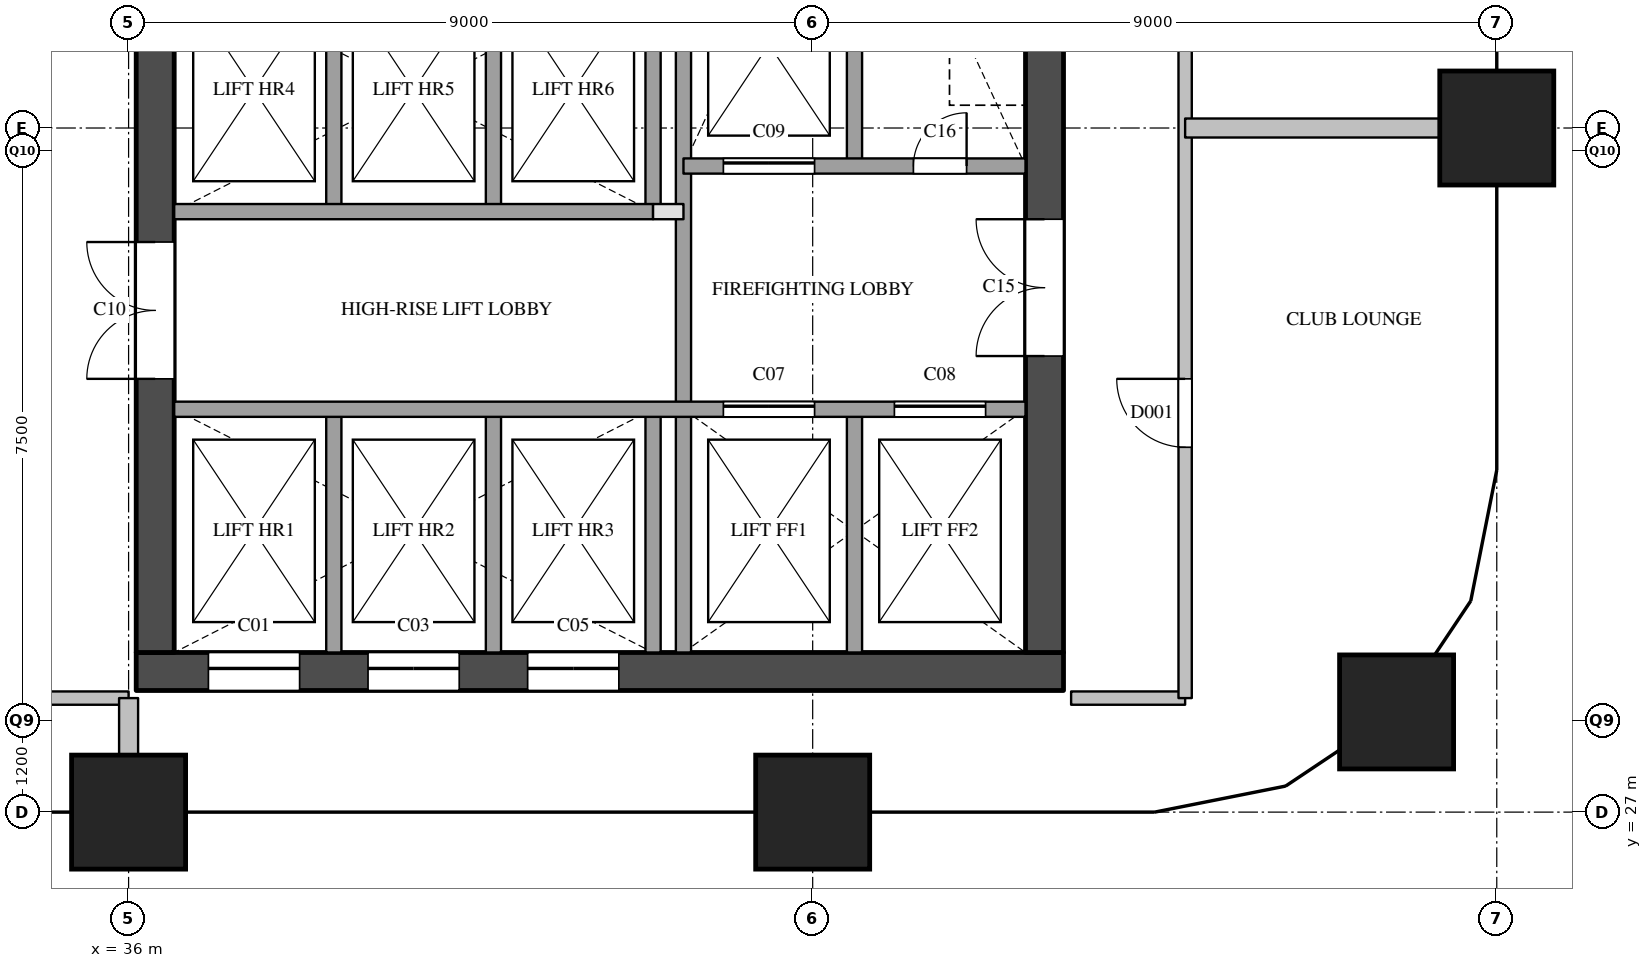
"""IFC4 building model, lengths in metres.
Left out: names, types, materials, properties, quantities, classifications, styles, units other than length and angle.
Written with IfcOpenShell. Run it as: python <this file> out.ifc"""

import sys

from ifc_helpers import new_model, si_unit, direction, frame, frame_2d, origin, origin_2d, place, context, subcontext, project, spatial, rectangle, extrude, element, fill, save


model = new_model("IFC4")
c1 = context("Model", 3, precision=1e-05, world=origin(), true_north=direction((0.0, 1.0)))
c2 = subcontext(c1, "Body", "Model", "MODEL_VIEW")
j1 = project(units=[si_unit("LENGTHUNIT", "METRE"), si_unit("PLANEANGLEUNIT", "RADIAN")], contexts=[c1])
p1 = place(None, origin())
s1 = spatial("IfcSite", under=j1, at=p1, CompositionType="ELEMENT")
p2 = place(p1, origin())
s2 = spatial("IfcBuilding", under=s1, at=p2, CompositionType="ELEMENT")
p3 = place(p2, frame((0.0, 0.0, 138.8)))
s3 = spatial("IfcBuildingStorey", under=s2, at=p3, CompositionType="ELEMENT", Elevation=138.8)
for number, where, z_axis, x_axis in (
    (1, (36.0, 27.0, 0.0), (0.0, 0.0, 1.0), (1.0, 0.0, 0.0)),
    (2, (45.0, 27.0, 0.0), (0.0, 0.0, 1.0), (1.0, 0.0, 0.0)),
    (3, (52.682, 28.318, 0.0), (0.0, 0.0, 1.0), (1.0, 0.0, 0.0)),
    (4, (54.0, 36.0, 0.0), (0.0, 0.0, 1.0), (1.0, 0.0, 0.0)),
):
    element("IfcColumn", number, at=place(p3, frame(where, z_axis=z_axis, x_axis=x_axis)), inside=s3, PredefinedType="COLUMN", context=c2, shape_type="SweptSolid", body=[
        extrude(rectangle(XDim=1.5, YDim=1.5, at=origin_2d()), origin(), (0.0, 0.0, 1.0), 3.9),
    ])
p4 = place(p3, frame((36.1, 28.85, 0.0), z_axis=(0.0, 0.0, 1.0), x_axis=(1.0, 0.0, 0.0)))
e5 = element("IfcWall", 5, at=p4, inside=s3, PredefinedType="SHEAR", context=c2, shape_type="SweptSolid", body=[
    extrude(rectangle(XDim=12.2, YDim=0.5, at=frame_2d((6.1, 0.0))), origin(), (0.0, 0.0, 1.0), 3.6),
])
p5 = place(p4, frame((0.95, 0.0, 0.0)))
e6 = element("IfcOpeningElement", 6, at=p5, cuts=e5, PredefinedType="OPENING", context=c2, shape_type="SweptSolid", body=[
    extrude(rectangle(XDim=1.2, YDim=2.1, at=frame_2d((0.6, 1.05))), frame((0.0, 0.26, 0.0), z_axis=(0.0, -1.0, 0.0), x_axis=(1.0, 0.0, 0.0)), (0.0, 0.0, 1.0), 0.52),
])
p6 = place(p4, frame((3.05, 0.0, 0.0)))
e7 = element("IfcOpeningElement", 7, at=p6, cuts=e5, PredefinedType="OPENING", context=c2, shape_type="SweptSolid", body=[
    extrude(rectangle(XDim=1.2, YDim=2.1, at=frame_2d((0.6, 1.05))), frame((0.0, 0.26, 0.0), z_axis=(0.0, -1.0, 0.0), x_axis=(1.0, 0.0, 0.0)), (0.0, 0.0, 1.0), 0.52),
])
p7 = place(p4, frame((5.15, 0.0, 0.0)))
e8 = element("IfcOpeningElement", 8, at=p7, cuts=e5, PredefinedType="OPENING", context=c2, shape_type="SweptSolid", body=[
    extrude(rectangle(XDim=1.2, YDim=2.1, at=frame_2d((0.6, 1.05))), frame((0.0, 0.26, 0.0), z_axis=(0.0, -1.0, 0.0), x_axis=(1.0, 0.0, 0.0)), (0.0, 0.0, 1.0), 0.52),
])
p8 = place(p3, frame((36.35, 29.1, 0.0), z_axis=(0.0, 0.0, 1.0), x_axis=(0.0, 1.0, 0.0)))
e9 = element("IfcWall", 9, at=p8, inside=s3, PredefinedType="SHEAR", context=c2, shape_type="SweptSolid", body=[
    extrude(rectangle(XDim=20.3, YDim=0.5, at=frame_2d((10.15, 0.0))), origin(), (0.0, 0.0, 1.0), 3.6),
])
p9 = place(p8, frame((3.6, 0.0, 0.0)))
e10 = element("IfcOpeningElement", 10, at=p9, cuts=e9, PredefinedType="OPENING", context=c2, shape_type="SweptSolid", body=[
    extrude(rectangle(XDim=1.8, YDim=2.1, at=frame_2d((0.9, 1.05))), frame((0.0, 0.26, 0.0), z_axis=(0.0, -1.0, 0.0), x_axis=(1.0, 0.0, 0.0)), (0.0, 0.0, 1.0), 0.52),
])
p10 = place(p8, frame((16.4, 0.0, 0.0)))
e11 = element("IfcOpeningElement", 11, at=p10, cuts=e9, PredefinedType="OPENING", context=c2, shape_type="SweptSolid", body=[
    extrude(rectangle(XDim=1.0, YDim=2.1, at=frame_2d((0.5, 1.05))), frame((0.0, 0.26, 0.0), z_axis=(0.0, -1.0, 0.0), x_axis=(1.0, 0.0, 0.0)), (0.0, 0.0, 1.0), 0.52),
])
p11 = place(p3, frame((48.05, 29.1, 0.0), z_axis=(0.0, 0.0, 1.0), x_axis=(0.0, 1.0, 0.0)))
e12 = element("IfcWall", 12, at=p11, inside=s3, PredefinedType="SHEAR", context=c2, shape_type="SweptSolid", body=[
    extrude(rectangle(XDim=20.3, YDim=0.5, at=frame_2d((10.15, 0.0))), origin(), (0.0, 0.0, 1.0), 3.6),
])
p12 = place(p11, frame((12.5, 0.0, 0.0)))
e13 = element("IfcOpeningElement", 13, at=p12, cuts=e12, PredefinedType="OPENING", context=c2, shape_type="SweptSolid", body=[
    extrude(rectangle(XDim=0.7, YDim=2.1, at=frame_2d((0.35, 1.05))), frame((0.0, 0.26, 0.0), z_axis=(0.0, -1.0, 0.0), x_axis=(1.0, 0.0, 0.0)), (0.0, 0.0, 1.0), 0.52),
])
p13 = place(p11, frame((3.9, 0.0, 0.0)))
e14 = element("IfcOpeningElement", 14, at=p13, cuts=e12, PredefinedType="OPENING", context=c2, shape_type="SweptSolid", body=[
    extrude(rectangle(XDim=1.8, YDim=2.1, at=frame_2d((0.9, 1.05))), frame((0.0, 0.26, 0.0), z_axis=(0.0, -1.0, 0.0), x_axis=(1.0, 0.0, 0.0)), (0.0, 0.0, 1.0), 0.52),
])
p14 = place(p3, frame((38.7, 29.1, 0.0), z_axis=(0.0, 0.0, 1.0), x_axis=(0.0, 1.0, 0.0)))
e15 = element("IfcWall", 15, at=p14, inside=s3, PredefinedType="SOLIDWALL", context=c2, shape_type="SweptSolid", body=[
    extrude(rectangle(XDim=3.2, YDim=0.2, at=frame_2d((1.6, 0.0))), origin(), (0.0, 0.0, 1.0), 3.6),
])
p15 = place(p3, frame((38.7, 34.9, 0.0), z_axis=(0.0, 0.0, 1.0), x_axis=(0.0, 1.0, 0.0)))
e16 = element("IfcWall", 16, at=p15, inside=s3, PredefinedType="SOLIDWALL", context=c2, shape_type="SweptSolid", body=[
    extrude(rectangle(XDim=3.2, YDim=0.2, at=frame_2d((1.6, 0.0))), origin(), (0.0, 0.0, 1.0), 3.6),
])
p16 = place(p3, frame((40.8, 29.1, 0.0), z_axis=(0.0, 0.0, 1.0), x_axis=(0.0, 1.0, 0.0)))
e17 = element("IfcWall", 17, at=p16, inside=s3, PredefinedType="SOLIDWALL", context=c2, shape_type="SweptSolid", body=[
    extrude(rectangle(XDim=3.2, YDim=0.2, at=frame_2d((1.6, 0.0))), origin(), (0.0, 0.0, 1.0), 3.6),
])
p17 = place(p3, frame((40.8, 34.9, 0.0), z_axis=(0.0, 0.0, 1.0), x_axis=(0.0, 1.0, 0.0)))
e18 = element("IfcWall", 18, at=p17, inside=s3, PredefinedType="SOLIDWALL", context=c2, shape_type="SweptSolid", body=[
    extrude(rectangle(XDim=3.2, YDim=0.2, at=frame_2d((1.6, 0.0))), origin(), (0.0, 0.0, 1.0), 3.6),
])
p18 = place(p3, frame((42.9, 29.1, 0.0), z_axis=(0.0, 0.0, 1.0), x_axis=(0.0, 1.0, 0.0)))
e19 = element("IfcWall", 19, at=p18, inside=s3, PredefinedType="SOLIDWALL", context=c2, shape_type="SweptSolid", body=[
    extrude(rectangle(XDim=3.2, YDim=0.2, at=frame_2d((1.6, 0.0))), origin(), (0.0, 0.0, 1.0), 3.6),
])
p19 = place(p3, frame((42.9, 34.9, 0.0), z_axis=(0.0, 0.0, 1.0), x_axis=(0.0, 1.0, 0.0)))
e20 = element("IfcWall", 20, at=p19, inside=s3, PredefinedType="SOLIDWALL", context=c2, shape_type="SweptSolid", body=[
    extrude(rectangle(XDim=3.2, YDim=0.2, at=frame_2d((1.6, 0.0))), origin(), (0.0, 0.0, 1.0), 3.6),
])
p20 = place(p3, frame((43.3, 29.1, 0.0), z_axis=(0.0, 0.0, 1.0), x_axis=(0.0, 1.0, 0.0)))
e21 = element("IfcWall", 21, at=p20, inside=s3, PredefinedType="SOLIDWALL", context=c2, shape_type="SweptSolid", body=[
    extrude(rectangle(XDim=9.9, YDim=0.2, at=frame_2d((4.95, 0.0))), origin(), (0.0, 0.0, 1.0), 3.6),
])
for number, where, z_axis, x_axis in (
    (22, (45.55, 29.1, 0.0), (0.0, 0.0, 1.0), (0.0, 1.0, 0.0)),
    (23, (45.55, 35.5, 0.0), (0.0, 0.0, 1.0), (0.0, 1.0, 0.0)),
):
    element("IfcWall", number, at=place(p3, frame(where, z_axis=z_axis, x_axis=x_axis)), inside=s3, PredefinedType="SOLIDWALL", context=c2, shape_type="SweptSolid", body=[
        extrude(rectangle(XDim=3.2, YDim=0.2, at=frame_2d((1.6, 0.0))), origin(), (0.0, 0.0, 1.0), 3.6),
    ])
p21 = place(p3, frame((36.6, 32.3, 0.0), z_axis=(0.0, 0.0, 1.0), x_axis=(1.0, 0.0, 0.0)))
e24 = element("IfcWall", 24, at=p21, inside=s3, PredefinedType="SOLIDWALL", context=c2, shape_type="SweptSolid", body=[
    extrude(rectangle(XDim=11.2, YDim=0.2, at=frame_2d((5.6, 0.0))), origin(), (0.0, 0.0, 1.0), 3.6),
])
p22 = place(p21, frame((7.225, 0.0, 0.0)))
e25 = element("IfcOpeningElement", 25, at=p22, cuts=e24, PredefinedType="OPENING", context=c2, shape_type="SweptSolid", body=[
    extrude(rectangle(XDim=1.2, YDim=2.1, at=frame_2d((0.6, 1.05))), frame((0.0, 0.11, 0.0), z_axis=(0.0, -1.0, 0.0), x_axis=(1.0, 0.0, 0.0)), (0.0, 0.0, 1.0), 0.22),
])
p23 = place(p21, frame((9.475, 0.0, 0.0)))
e26 = element("IfcOpeningElement", 26, at=p23, cuts=e24, PredefinedType="OPENING", context=c2, shape_type="SweptSolid", body=[
    extrude(rectangle(XDim=1.2, YDim=2.1, at=frame_2d((0.6, 1.05))), frame((0.0, 0.11, 0.0), z_axis=(0.0, -1.0, 0.0), x_axis=(1.0, 0.0, 0.0)), (0.0, 0.0, 1.0), 0.22),
])
p24 = place(p3, frame((42.9, 34.9, 0.0), z_axis=(0.0, 0.0, 1.0), x_axis=(1.0, 0.0, 0.0)))
e27 = element("IfcWall", 27, at=p24, inside=s3, PredefinedType="PARTITIONING", context=c2, shape_type="SweptSolid", body=[
    extrude(rectangle(XDim=0.4, YDim=0.2, at=frame_2d((0.2, 0.0))), origin(), (0.0, 0.0, 1.0), 3.6),
])
p25 = place(p3, frame((36.6, 34.9, 0.0), z_axis=(0.0, 0.0, 1.0), x_axis=(1.0, 0.0, 0.0)))
e28 = element("IfcWall", 28, at=p25, inside=s3, PredefinedType="SOLIDWALL", context=c2, shape_type="SweptSolid", body=[
    extrude(rectangle(XDim=6.3, YDim=0.2, at=frame_2d((3.15, 0.0))), origin(), (0.0, 0.0, 1.0), 3.6),
])
p26 = place(p3, frame((43.3, 35.5, 0.0), z_axis=(0.0, 0.0, 1.0), x_axis=(1.0, 0.0, 0.0)))
e29 = element("IfcWall", 29, at=p26, inside=s3, PredefinedType="SOLIDWALL", context=c2, shape_type="SweptSolid", body=[
    extrude(rectangle(XDim=4.5, YDim=0.2, at=frame_2d((2.25, 0.0))), origin(), (0.0, 0.0, 1.0), 3.6),
])
p27 = place(p26, frame((0.525, 0.0, 0.0)))
e30 = element("IfcOpeningElement", 30, at=p27, cuts=e29, PredefinedType="OPENING", context=c2, shape_type="SweptSolid", body=[
    extrude(rectangle(XDim=1.2, YDim=2.1, at=frame_2d((0.6, 1.05))), frame((0.0, 0.11, 0.0), z_axis=(0.0, -1.0, 0.0), x_axis=(1.0, 0.0, 0.0)), (0.0, 0.0, 1.0), 0.22),
])
p28 = place(p26, frame((3.025, 0.0, 0.0)))
e31 = element("IfcOpeningElement", 31, at=p28, cuts=e29, PredefinedType="OPENING", context=c2, shape_type="SweptSolid", body=[
    extrude(rectangle(XDim=0.7, YDim=2.1, at=frame_2d((0.35, 1.05))), frame((0.0, 0.11, 0.0), z_axis=(0.0, -1.0, 0.0), x_axis=(1.0, 0.0, 0.0)), (0.0, 0.0, 1.0), 0.22),
])
for number, where, z_axis, x_axis in (
    (32, (34.5, 28.5, 0.0), (0.0, 0.0, 1.0), (1.0, 0.0, 0.0)),
    (33, (48.4, 28.5, 0.0), (0.0, 0.0, 1.0), (1.0, 0.0, 0.0)),
):
    element("IfcWall", number, at=place(p3, frame(where, z_axis=z_axis, x_axis=x_axis)), inside=s3, PredefinedType="PARTITIONING", context=c2, shape_type="SweptSolid", body=[
        extrude(rectangle(XDim=1.5, YDim=0.175, at=frame_2d((0.75, 0.0))), origin(), (0.0, 0.0, 1.0), 3.6),
    ])
p29 = place(p3, frame((49.9, 28.5, 0.0), z_axis=(0.0, 0.0, 1.0), x_axis=(0.0, 1.0, 0.0)))
e34 = element("IfcWall", 34, at=p29, inside=s3, PredefinedType="PARTITIONING", context=c2, shape_type="SweptSolid", body=[
    extrude(rectangle(XDim=23.0, YDim=0.175, at=frame_2d((11.5, 0.0))), origin(), (0.0, 0.0, 1.0), 3.6),
])
p30 = place(p29, frame((3.3, 0.0, 0.0)))
e35 = element("IfcOpeningElement", 35, at=p30, cuts=e34, PredefinedType="OPENING", context=c2, shape_type="SweptSolid", body=[
    extrude(rectangle(XDim=0.9, YDim=2.1, at=frame_2d((0.45, 1.05))), frame((0.0, 0.097, 0.0), z_axis=(0.0, -1.0, 0.0), x_axis=(1.0, 0.0, 0.0)), (0.0, 0.0, 1.0), 0.195),
])
p31 = place(p29, frame((11.05, 0.0, 0.0)))
e36 = element("IfcOpeningElement", 36, at=p31, cuts=e34, PredefinedType="OPENING", context=c2, shape_type="SweptSolid", body=[
    extrude(rectangle(XDim=0.9, YDim=2.1, at=frame_2d((0.45, 1.05))), frame((0.0, 0.097, 0.0), z_axis=(0.0, -1.0, 0.0), x_axis=(1.0, 0.0, 0.0)), (0.0, 0.0, 1.0), 0.195),
])
p32 = place(p29, frame((18.8, 0.0, 0.0)))
e37 = element("IfcOpeningElement", 37, at=p32, cuts=e34, PredefinedType="OPENING", context=c2, shape_type="SweptSolid", body=[
    extrude(rectangle(XDim=0.9, YDim=2.1, at=frame_2d((0.45, 1.05))), frame((0.0, 0.097, 0.0), z_axis=(0.0, -1.0, 0.0), x_axis=(1.0, 0.0, 0.0)), (0.0, 0.0, 1.0), 0.195),
])
p33 = place(p3, frame((49.9, 36.0, 0.0), z_axis=(0.0, 0.0, 1.0), x_axis=(1.0, 0.0, 0.0)))
e38 = element("IfcWall", 38, at=p33, inside=s3, PredefinedType="PARTITIONING", context=c2, shape_type="SweptSolid", body=[
    extrude(rectangle(XDim=4.1, YDim=0.25, at=frame_2d((2.05, 0.0))), origin(), (0.0, 0.0, 1.0), 3.6),
])
p34 = place(p3, frame((36.0, 27.0, 0.0), z_axis=(0.0, 0.0, 1.0), x_axis=(0.0, 1.0, 0.0)))
e39 = element("IfcWall", 39, at=p34, inside=s3, PredefinedType="PARTITIONING", context=c2, shape_type="SweptSolid", body=[
    extrude(rectangle(XDim=1.5, YDim=0.25, at=frame_2d((0.75, 0.0))), origin(), (0.0, 0.0, 1.0), 3.6),
])
p35 = place(p5, origin())
e40 = element("IfcDoor", 40, at=p35, inside=s3, OperationType="SLIDING_TO_LEFT", PredefinedType="DOOR", context=c2, shape_type="SweptSolid", body=[
    extrude(rectangle(XDim=1.2, YDim=2.1, at=frame_2d((0.6, 1.05))), frame((0.0, 0.025, 0.0), z_axis=(0.0, -1.0, 0.0), x_axis=(1.0, 0.0, 0.0)), (0.0, 0.0, 1.0), 0.05),
])
fill(e6, e40)
p36 = place(p6, origin())
e41 = element("IfcDoor", 41, at=p36, inside=s3, OperationType="SLIDING_TO_LEFT", PredefinedType="DOOR", context=c2, shape_type="SweptSolid", body=[
    extrude(rectangle(XDim=1.2, YDim=2.1, at=frame_2d((0.6, 1.05))), frame((0.0, 0.025, 0.0), z_axis=(0.0, -1.0, 0.0), x_axis=(1.0, 0.0, 0.0)), (0.0, 0.0, 1.0), 0.05),
])
fill(e7, e41)
p37 = place(p7, origin())
e42 = element("IfcDoor", 42, at=p37, inside=s3, OperationType="SLIDING_TO_LEFT", PredefinedType="DOOR", context=c2, shape_type="SweptSolid", body=[
    extrude(rectangle(XDim=1.2, YDim=2.1, at=frame_2d((0.6, 1.05))), frame((0.0, 0.025, 0.0), z_axis=(0.0, -1.0, 0.0), x_axis=(1.0, 0.0, 0.0)), (0.0, 0.0, 1.0), 0.05),
])
fill(e8, e42)
p38 = place(p22, origin())
e43 = element("IfcDoor", 43, at=p38, inside=s3, OperationType="SLIDING_TO_LEFT", PredefinedType="DOOR", context=c2, shape_type="SweptSolid", body=[
    extrude(rectangle(XDim=1.2, YDim=2.1, at=frame_2d((0.6, 1.05))), frame((0.0, 0.025, 0.0), z_axis=(0.0, -1.0, 0.0), x_axis=(1.0, 0.0, 0.0)), (0.0, 0.0, 1.0), 0.05),
])
fill(e25, e43)
p39 = place(p23, origin())
e44 = element("IfcDoor", 44, at=p39, inside=s3, OperationType="SLIDING_TO_LEFT", PredefinedType="DOOR", context=c2, shape_type="SweptSolid", body=[
    extrude(rectangle(XDim=1.2, YDim=2.1, at=frame_2d((0.6, 1.05))), frame((0.0, 0.025, 0.0), z_axis=(0.0, -1.0, 0.0), x_axis=(1.0, 0.0, 0.0)), (0.0, 0.0, 1.0), 0.05),
])
fill(e26, e44)
p40 = place(p27, origin())
e45 = element("IfcDoor", 45, at=p40, inside=s3, OperationType="SLIDING_TO_LEFT", PredefinedType="DOOR", context=c2, shape_type="SweptSolid", body=[
    extrude(rectangle(XDim=1.2, YDim=2.1, at=frame_2d((0.6, 1.05))), frame((0.0, 0.025, 0.0), z_axis=(0.0, -1.0, 0.0), x_axis=(1.0, 0.0, 0.0)), (0.0, 0.0, 1.0), 0.05),
])
fill(e30, e45)
p41 = place(p9, origin())
e46 = element("IfcDoor", 46, at=p41, inside=s3, OperationType="DOUBLE_DOOR_SINGLE_SWING", PredefinedType="DOOR", context=c2, shape_type="SweptSolid", body=[
    extrude(rectangle(XDim=1.8, YDim=2.1, at=frame_2d((0.9, 1.05))), frame((0.0, 0.025, 0.0), z_axis=(0.0, -1.0, 0.0), x_axis=(1.0, 0.0, 0.0)), (0.0, 0.0, 1.0), 0.05),
])
fill(e10, e46)
p42 = place(p13, origin())
e47 = element("IfcDoor", 47, at=p42, inside=s3, OperationType="DOUBLE_DOOR_SINGLE_SWING", PredefinedType="DOOR", context=c2, shape_type="SweptSolid", body=[
    extrude(rectangle(XDim=1.8, YDim=2.1, at=frame_2d((0.9, 1.05))), frame((0.0, 0.025, 0.0), z_axis=(0.0, -1.0, 0.0), x_axis=(1.0, 0.0, 0.0)), (0.0, 0.0, 1.0), 0.05),
])
fill(e14, e47)
p43 = place(p28, origin())
e48 = element("IfcDoor", 48, at=p43, inside=s3, OperationType="SINGLE_SWING_RIGHT", PredefinedType="DOOR", context=c2, shape_type="SweptSolid", body=[
    extrude(rectangle(XDim=0.7, YDim=2.1, at=frame_2d((0.35, 1.05))), frame((0.0, 0.025, 0.0), z_axis=(0.0, -1.0, 0.0), x_axis=(1.0, 0.0, 0.0)), (0.0, 0.0, 1.0), 0.05),
])
fill(e31, e48)
p44 = place(p30, origin())
e49 = element("IfcDoor", 49, at=p44, inside=s3, OperationType="SINGLE_SWING_RIGHT", PredefinedType="DOOR", context=c2, shape_type="SweptSolid", body=[
    extrude(rectangle(XDim=0.9, YDim=2.1, at=frame_2d((0.45, 1.05))), frame((0.0, 0.025, 0.0), z_axis=(0.0, -1.0, 0.0), x_axis=(1.0, 0.0, 0.0)), (0.0, 0.0, 1.0), 0.05),
])
fill(e35, e49)
save(model, sys.argv[1])
